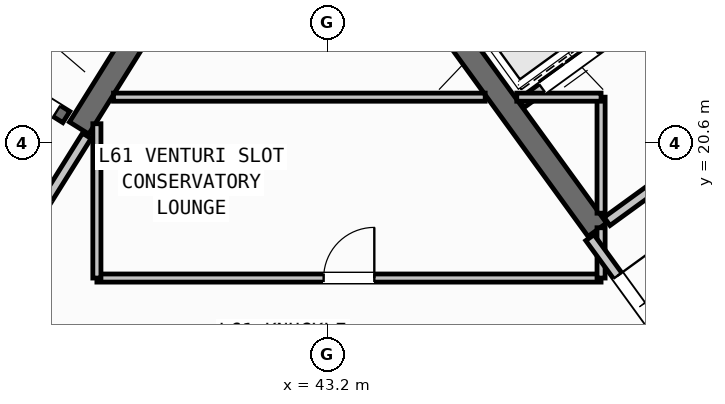
"""IFC4 building model, lengths in metres.
Left out: names, types, materials, properties, quantities, classifications, styles, units other than length and angle.
Written with IfcOpenShell. Run it as: python <this file> out.ifc"""

import sys

from ifc_helpers import new_model, si_unit, direction, frame, frame_2d, origin, place, context, subcontext, project, spatial, rectangle, extrude, source, transform, mapped, element, fill, save


model = new_model("IFC4")
c1 = context("Model", 3, precision=1e-05, world=origin(), true_north=direction((0.0, 1.0)))
c2 = subcontext(c1, "Body", "Model", "MODEL_VIEW")
j1 = project(units=[si_unit("LENGTHUNIT", "METRE"), si_unit("PLANEANGLEUNIT", "RADIAN")], contexts=[c1])
p1 = place(None, origin())
s1 = spatial("IfcSite", under=j1, at=p1, CompositionType="ELEMENT")
p2 = place(p1, origin())
s2 = spatial("IfcBuilding", under=s1, at=p2, CompositionType="ELEMENT")
p3 = place(p2, frame((0.0, 0.0, 242.1)))
s3 = spatial("IfcBuildingStorey", under=s2, at=p3, CompositionType="ELEMENT", Elevation=242.1)
p4 = place(p3, frame((40.221, 23.965, 0.0), z_axis=(0.0, 0.0, 1.0), x_axis=(-0.529902075036, -0.848058836916, 0.0)))
e1 = element("IfcWall", 1, at=p4, inside=s3, PredefinedType="SHEAR", context=c2, shape_type="SweptSolid", body=[
    extrude(rectangle(XDim=3.625, YDim=0.45, at=frame_2d((1.812, 0.0))), origin(), (0.0, 0.0, 1.0), 3.32),
])
p5 = place(p3, frame((48.526, 18.884, 0.0), z_axis=(0.0, 0.0, 1.0), x_axis=(-0.587774812919, 0.809024578921, 0.0)))
e2 = element("IfcWall", 2, at=p5, inside=s3, PredefinedType="SHEAR", context=c2, shape_type="SweptSolid", body=[
    extrude(rectangle(XDim=6.475, YDim=0.45, at=frame_2d((3.238, 0.0))), origin(), (0.0, 0.0, 1.0), 3.32),
])
p6 = place(p3, frame((38.046, 21.108, 0.0), z_axis=(0.0, 0.0, 1.0), x_axis=(-0.848054434086, 0.529909121291, 0.0)))
e3 = element("IfcWall", 3, at=p6, inside=s3, PredefinedType="SHEAR", context=c2, shape_type="SweptSolid", body=[
    extrude(rectangle(XDim=7.33, YDim=0.26, at=frame_2d((3.665, 0.0))), origin(), (0.0, 0.0, 1.0), 3.32),
])
p7 = place(p6, frame((0.22, 0.0, 0.0)))
e4 = element("IfcOpeningElement", 4, at=p7, cuts=e3, PredefinedType="OPENING", context=c2, shape_type="SweptSolid", body=[
    extrude(rectangle(XDim=1.1, YDim=2.1, at=frame_2d((0.55, 1.05))), frame((0.0, 0.14, 0.0), z_axis=(0.0, -1.0, 0.0), x_axis=(1.0, 0.0, 0.0)), (0.0, 0.0, 1.0), 0.28),
])
p8 = place(p3, frame((47.025, 21.378, 0.0), z_axis=(0.0, 0.0, 1.0), x_axis=(0.809052869724, 0.587735870941, 0.0)))
e5 = element("IfcWall", 5, at=p8, inside=s3, PredefinedType="STANDARD", context=c2, shape_type="SweptSolid", body=[
    extrude(rectangle(XDim=3.498, YDim=0.2, at=frame_2d((1.749, 0.0))), origin(), (0.0, 0.0, 1.0), 3.31),
])
p9 = place(p8, frame((0.508, 0.0, 0.0)))
e6 = element("IfcOpeningElement", 6, at=p9, cuts=e5, PredefinedType="OPENING", context=c2, shape_type="SweptSolid", body=[
    extrude(rectangle(XDim=1.3, YDim=2.2, at=frame_2d((0.65, 1.1))), frame((0.0, 0.11, 0.0), z_axis=(0.0, -1.0, 0.0), x_axis=(1.0, 0.0, 0.0)), (0.0, 0.0, 1.0), 0.22),
])
p10 = place(p3, frame((48.718, 19.048, 0.0), z_axis=(0.0, 0.0, 1.0), x_axis=(0.809017261719, 0.587784884325, 0.0)))
e7 = element("IfcWall", 7, at=p10, inside=s3, PredefinedType="STANDARD", context=c2, shape_type="SweptSolid", body=[
    extrude(rectangle(XDim=5.818, YDim=0.2, at=frame_2d((2.909, 0.0))), origin(), (0.0, 0.0, 1.0), 3.31),
])
p11 = place(p10, frame((2.598, 0.0, 0.0)))
e8 = element("IfcOpeningElement", 8, at=p11, cuts=e7, PredefinedType="OPENING", context=c2, shape_type="SweptSolid", body=[
    extrude(rectangle(XDim=1.15, YDim=2.1, at=frame_2d((0.575, 1.05))), frame((0.0, 0.11, 0.0), z_axis=(0.0, -1.0, 0.0), x_axis=(1.0, 0.0, 0.0)), (0.0, 0.0, 1.0), 0.22),
])
p12 = place(p3, frame((38.451, 20.737, 0.0), z_axis=(0.0, 0.0, 1.0), x_axis=(-0.529924799939, -0.848044637038, 0.0)))
e9 = element("IfcWall", 9, at=p12, inside=s3, PredefinedType="STANDARD", context=c2, shape_type="SweptSolid", body=[
    extrude(rectangle(XDim=2.96, YDim=0.2, at=frame_2d((1.48, 0.0))), origin(), (0.0, 0.0, 1.0), 3.31),
])
p13 = place(p12, frame((1.46, 0.0, 0.0)))
e10 = element("IfcOpeningElement", 10, at=p13, cuts=e9, PredefinedType="OPENING", context=c2, shape_type="SweptSolid", body=[
    extrude(rectangle(XDim=0.86, YDim=2.05, at=frame_2d((0.43, 1.025))), frame((0.0, 0.11, 0.0), z_axis=(0.0, -1.0, 0.0), x_axis=(1.0, 0.0, 0.0)), (0.0, 0.0, 1.0), 0.22),
])
p14 = place(p3, frame((38.65, 17.93, 0.0), z_axis=(0.0, 0.0, 1.0), x_axis=(1.0, 0.0, 0.0)))
e11 = element("IfcWall", 11, at=p14, inside=s3, PredefinedType="PARTITIONING", context=c2, shape_type="SweptSolid", body=[
    extrude(rectangle(XDim=9.95, YDim=0.16, at=frame_2d((4.975, 0.0))), origin(), (0.0, 0.0, 1.0), 3.31),
])
p15 = place(p14, frame((4.475, 0.0, 0.0)))
e12 = element("IfcOpeningElement", 12, at=p15, cuts=e11, PredefinedType="OPENING", context=c2, shape_type="SweptSolid", body=[
    extrude(rectangle(XDim=1.0, YDim=2.1, at=frame_2d((0.5, 1.05))), frame((0.0, 0.09, 0.0), z_axis=(0.0, -1.0, 0.0), x_axis=(1.0, 0.0, 0.0)), (0.0, 0.0, 1.0), 0.18),
])
p16 = place(p3, frame((38.65, 17.93, 0.0), z_axis=(0.0, 0.0, 1.0), x_axis=(0.0, 1.0, 0.0)))
e13 = element("IfcWall", 13, at=p16, inside=s3, PredefinedType="PARTITIONING", context=c2, shape_type="SweptSolid", body=[
    extrude(rectangle(XDim=3.046, YDim=0.16, at=frame_2d((1.523, 0.0))), origin(), (0.0, 0.0, 1.0), 3.31),
])
p17 = place(p3, frame((48.6, 17.93, 0.0), z_axis=(0.0, 0.0, 1.0), x_axis=(0.0, 1.0, 0.0)))
e14 = element("IfcWall", 14, at=p17, inside=s3, PredefinedType="PARTITIONING", context=c2, shape_type="SweptSolid", body=[
    extrude(rectangle(XDim=0.993, YDim=0.16, at=frame_2d((0.496, 0.0))), origin(), (0.0, 0.0, 1.0), 3.31),
])
p18 = place(p3, frame((48.6, 19.21, 0.0), z_axis=(0.0, 0.0, 1.0), x_axis=(0.0, 1.0, 0.0)))
e15 = element("IfcWall", 15, at=p18, inside=s3, PredefinedType="PARTITIONING", context=c2, shape_type="SweptSolid", body=[
    extrude(rectangle(XDim=2.29, YDim=0.16, at=frame_2d((1.145, 0.0))), origin(), (0.0, 0.0, 1.0), 3.31),
])
p19 = place(p3, frame((38.978, 21.5, 0.0), z_axis=(0.0, 0.0, 1.0), x_axis=(1.0, 0.0, 0.0)))
e16 = element("IfcWall", 16, at=p19, inside=s3, PredefinedType="PARTITIONING", context=c2, shape_type="SweptSolid", body=[
    extrude(rectangle(XDim=7.336, YDim=0.16, at=frame_2d((3.668, 0.0))), origin(), (0.0, 0.0, 1.0), 3.31),
])
p20 = place(p3, frame((46.936, 21.5, 0.0), z_axis=(0.0, 0.0, 1.0), x_axis=(1.0, 0.0, 0.0)))
e17 = element("IfcWall", 17, at=p20, inside=s3, PredefinedType="PARTITIONING", context=c2, shape_type="SweptSolid", body=[
    extrude(rectangle(XDim=1.664, YDim=0.16, at=frame_2d((0.832, 0.0))), origin(), (0.0, 0.0, 1.0), 3.31),
])
p21 = place(p3, frame((50.119, 16.333, 0.0), z_axis=(0.0, 0.0, 1.0), x_axis=(-0.587749856981, 0.809042709391, 0.0)))
e18 = element("IfcWall", 18, at=p21, inside=s3, PredefinedType="STANDARD", context=c2, shape_type="SweptSolid", body=[
    extrude(rectangle(XDim=2.96, YDim=0.2, at=frame_2d((1.48, 0.0))), origin(), (0.0, 0.0, 1.0), 3.31),
])
p22 = place(p21, frame((0.53, 0.0, 0.0)))
e19 = element("IfcOpeningElement", 19, at=p22, cuts=e18, PredefinedType="OPENING", context=c2, shape_type="SweptSolid", body=[
    extrude(rectangle(XDim=1.5, YDim=2.15, at=frame_2d((0.75, 1.075))), frame((0.0, 0.11, 0.0), z_axis=(0.0, -1.0, 0.0), x_axis=(1.0, 0.0, 0.0)), (0.0, 0.0, 1.0), 0.22),
])
m1 = source(origin(), c2, "Body", "SweptSolid", [
    extrude(rectangle(XDim=1.1, YDim=2.1, at=frame_2d((0.55, 1.05))), frame((0.0, 0.025, 0.0), z_axis=(0.0, -1.0, 0.0), x_axis=(1.0, 0.0, 0.0)), (0.0, 0.0, 1.0), 0.05),
])
p23 = place(p7, origin())
e20 = element("IfcDoor", 20, at=p23, inside=s3, OperationType="SINGLE_SWING_RIGHT", PredefinedType="DOOR", context=c2, shape_type="MappedRepresentation", body=[
    mapped(m1, transform((0.0, 0.0, 0.0), scale=1.0)),
])
fill(e4, e20)
m2 = source(origin(), c2, "Body", "SweptSolid", [
    extrude(rectangle(XDim=1.3, YDim=2.2, at=frame_2d((0.65, 1.1))), frame((0.0, 0.025, 0.0), z_axis=(0.0, -1.0, 0.0), x_axis=(1.0, 0.0, 0.0)), (0.0, 0.0, 1.0), 0.05),
])
p24 = place(p9, origin())
e21 = element("IfcDoor", 21, at=p24, inside=s3, OperationType="DOUBLE_DOOR_SLIDING", PredefinedType="DOOR", context=c2, shape_type="MappedRepresentation", body=[
    mapped(m2, transform((0.0, 0.0, 0.0), scale=1.0)),
])
fill(e6, e21)
m3 = source(origin(), c2, "Body", "SweptSolid", [
    extrude(rectangle(XDim=1.0, YDim=2.1, at=frame_2d((0.5, 1.05))), frame((0.0, 0.025, 0.0), z_axis=(0.0, -1.0, 0.0), x_axis=(1.0, 0.0, 0.0)), (0.0, 0.0, 1.0), 0.05),
])
p25 = place(p15, origin())
e22 = element("IfcDoor", 22, at=p25, inside=s3, OperationType="SINGLE_SWING_RIGHT", PredefinedType="DOOR", context=c2, shape_type="MappedRepresentation", body=[
    mapped(m3, transform((0.0, 0.0, 0.0), scale=1.0)),
])
fill(e12, e22)
m4 = source(origin(), c2, "Body", "SweptSolid", [
    extrude(rectangle(XDim=1.5, YDim=2.15, at=frame_2d((0.75, 1.075))), frame((0.0, 0.025, 0.0), z_axis=(0.0, -1.0, 0.0), x_axis=(1.0, 0.0, 0.0)), (0.0, 0.0, 1.0), 0.05),
])
p26 = place(p22, frame((1.5, 0.0, 0.0), z_axis=(0.0, 0.0, 1.0), x_axis=(-1.0, 0.0, 0.0)))
e23 = element("IfcDoor", 23, at=p26, inside=s3, OperationType="DOUBLE_DOOR_SINGLE_SWING", PredefinedType="DOOR", context=c2, shape_type="MappedRepresentation", body=[
    mapped(m4, transform((0.0, 0.0, 0.0), scale=1.0)),
])
fill(e19, e23)
save(model, sys.argv[1])
